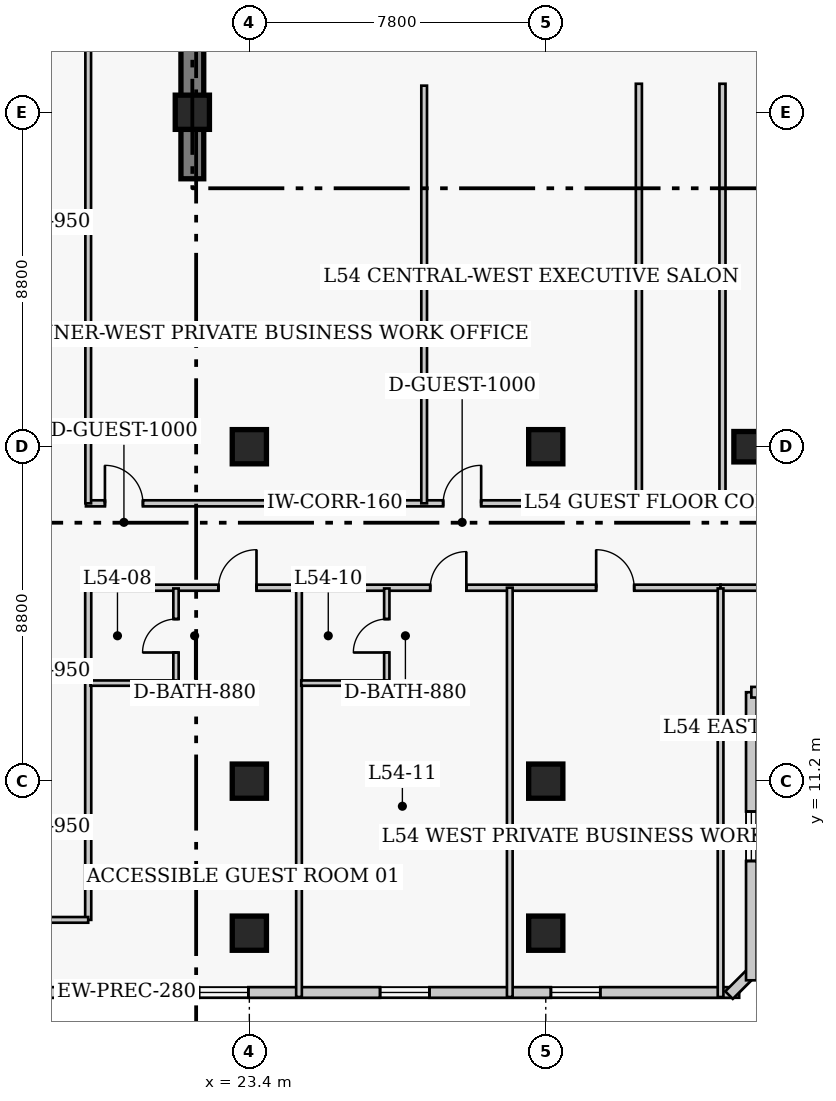
"""IFC4 building model, lengths in metres.
Left out: names, types, materials, properties, quantities, classifications, styles, units other than length and angle.
Written with IfcOpenShell. Run it as: python <this file> out.ifc"""

import sys

from ifc_helpers import new_model, si_unit, direction, frame, frame_2d, origin, origin_2d, place, context, subcontext, project, spatial, rectangle, extrude, element, fill, save


model = new_model("IFC4")
c1 = context("Model", 3, precision=1e-05, world=origin(), true_north=direction((0.0, 1.0)))
c2 = subcontext(c1, "Body", "Model", "MODEL_VIEW")
j1 = project(units=[si_unit("LENGTHUNIT", "METRE"), si_unit("PLANEANGLEUNIT", "RADIAN")], contexts=[c1])
p1 = place(None, origin())
s1 = spatial("IfcSite", under=j1, at=p1, CompositionType="ELEMENT")
p2 = place(p1, origin())
s2 = spatial("IfcBuilding", under=s1, at=p2, CompositionType="ELEMENT")
p3 = place(p2, frame((0.0, 0.0, 216.3)))
s3 = spatial("IfcBuildingStorey", under=s2, at=p3, CompositionType="ELEMENT", Elevation=216.3)
p4 = place(p3, frame((21.9, 27.05, 0.0), z_axis=(0.0, 0.0, 1.0), x_axis=(0.0, 1.0, 0.0)))
e1 = element("IfcWall", 1, at=p4, inside=s3, PredefinedType="SHEAR", context=c2, shape_type="SweptSolid", body=[
    extrude(rectangle(XDim=13.57, YDim=0.6, at=frame_2d((6.785, 0.0))), origin(), (0.0, 0.0, 1.0), 3.9),
])
for number, where, z_axis, x_axis in (
    (2, (23.4, 11.2, 0.0), (0.0, 0.0, 1.0), (1.0, 0.0, 0.0)),
    (3, (23.4, 20.0, 0.0), (0.0, 0.0, 1.0), (1.0, 0.0, 0.0)),
    (4, (31.2, 11.2, 0.0), (0.0, 0.0, 1.0), (1.0, 0.0, 0.0)),
    (5, (31.2, 20.0, 0.0), (0.0, 0.0, 1.0), (1.0, 0.0, 0.0)),
):
    element("IfcColumn", number, at=place(p3, frame(where, z_axis=z_axis, x_axis=x_axis)), inside=s3, PredefinedType="COLUMN", context=c2, shape_type="SweptSolid", body=[
        extrude(rectangle(XDim=0.9, YDim=0.9, at=origin_2d()), origin(), (0.0, 0.0, 1.0), 3.9),
    ])
p5 = place(p3, frame((36.75, 20.0, 0.0), z_axis=(0.0, 0.0, 1.0), x_axis=(1.0, 0.0, 0.0)))
e6 = element("IfcColumn", 6, at=p5, inside=s3, PredefinedType="COLUMN", context=c2, shape_type="SweptSolid", body=[
    extrude(rectangle(XDim=1.2, YDim=0.8, at=origin_2d()), origin(), (0.0, 0.0, 1.0), 3.9),
])
for number, where, z_axis, x_axis in (
    (7, (21.9, 28.8, 0.0), (0.0, 0.0, 1.0), (1.0, 0.0, 0.0)),
    (8, (23.4, 7.2, 0.0), (0.0, 0.0, 1.0), (1.0, 0.0, 0.0)),
    (9, (31.2, 7.2, 0.0), (0.0, 0.0, 1.0), (1.0, 0.0, 0.0)),
):
    element("IfcColumn", number, at=place(p3, frame(where, z_axis=z_axis, x_axis=x_axis)), inside=s3, PredefinedType="COLUMN", context=c2, shape_type="SweptSolid", body=[
        extrude(rectangle(XDim=0.9, YDim=0.9, at=origin_2d()), origin(), (0.0, 0.0, 1.0), 3.9),
    ])
p6 = place(p3, frame((10.46, 5.64, 0.0), z_axis=(0.0, 0.0, 1.0), x_axis=(1.0, 0.0, 0.0)))
e10 = element("IfcWall", 10, at=p6, inside=s3, PredefinedType="SOLIDWALL", context=c2, shape_type="SweptSolid", body=[
    extrude(rectangle(XDim=25.83, YDim=0.28, at=frame_2d((12.915, 0.0))), origin(), (0.0, 0.0, 1.0), 3.65),
])
p7 = place(p6, frame((4.305, 0.0, 0.85)))
e11 = element("IfcOpeningElement", 11, at=p7, cuts=e10, PredefinedType="OPENING", context=c2, shape_type="SweptSolid", body=[
    extrude(rectangle(XDim=1.3, YDim=1.7, at=frame_2d((0.65, 0.85))), frame((0.0, 0.15, 0.0), z_axis=(0.0, -1.0, 0.0), x_axis=(1.0, 0.0, 0.0)), (0.0, 0.0, 1.0), 0.3),
])
p8 = place(p6, frame((11.615, 0.0, 0.85)))
e12 = element("IfcOpeningElement", 12, at=p8, cuts=e10, PredefinedType="OPENING", context=c2, shape_type="SweptSolid", body=[
    extrude(rectangle(XDim=1.3, YDim=1.7, at=frame_2d((0.65, 0.85))), frame((0.0, 0.15, 0.0), z_axis=(0.0, -1.0, 0.0), x_axis=(1.0, 0.0, 0.0)), (0.0, 0.0, 1.0), 0.3),
])
p9 = place(p6, frame((20.875, 0.0, 0.85)))
e13 = element("IfcOpeningElement", 13, at=p9, cuts=e10, PredefinedType="OPENING", context=c2, shape_type="SweptSolid", body=[
    extrude(rectangle(XDim=1.3, YDim=1.7, at=frame_2d((0.65, 0.85))), frame((0.0, 0.15, 0.0), z_axis=(0.0, -1.0, 0.0), x_axis=(1.0, 0.0, 0.0)), (0.0, 0.0, 1.0), 0.3),
])
p10 = place(p6, frame((16.38, 0.0, 0.85)))
e14 = element("IfcOpeningElement", 14, at=p10, cuts=e10, PredefinedType="OPENING", context=c2, shape_type="SweptSolid", body=[
    extrude(rectangle(XDim=1.3, YDim=1.7, at=frame_2d((0.65, 0.85))), frame((0.0, 0.15, 0.0), z_axis=(0.0, -1.0, 0.0), x_axis=(1.0, 0.0, 0.0)), (0.0, 0.0, 1.0), 0.3),
])
p11 = place(p3, frame((36.023, 5.571, 0.0), z_axis=(0.0, 0.0, 1.0), x_axis=(0.707106781187, 0.707106781187, 0.0)))
e15 = element("IfcWall", 15, at=p11, inside=s3, PredefinedType="SOLIDWALL", context=c2, shape_type="SweptSolid", body=[
    extrude(rectangle(XDim=0.928, YDim=0.28, at=frame_2d((0.464, 0.0))), origin(), (0.0, 0.0, 1.0), 3.65),
])
p12 = place(p3, frame((36.61, 5.96, 0.0), z_axis=(0.0, 0.0, 1.0), x_axis=(0.0, 1.0, 0.0)))
e16 = element("IfcWall", 16, at=p12, inside=s3, PredefinedType="SOLIDWALL", context=c2, shape_type="SweptSolid", body=[
    extrude(rectangle(XDim=7.58, YDim=0.28, at=frame_2d((3.79, 0.0))), origin(), (0.0, 0.0, 1.0), 3.65),
])
p13 = place(p12, frame((3.14, 0.0, 0.85)))
e17 = element("IfcOpeningElement", 17, at=p13, cuts=e16, PredefinedType="OPENING", context=c2, shape_type="SweptSolid", body=[
    extrude(rectangle(XDim=1.3, YDim=1.7, at=frame_2d((0.65, 0.85))), frame((0.0, 0.15, 0.0), z_axis=(0.0, -1.0, 0.0), x_axis=(1.0, 0.0, 0.0)), (0.0, 0.0, 1.0), 0.3),
])
p14 = place(p3, frame((36.61, 13.54, 0.0), z_axis=(0.0, 0.0, 1.0), x_axis=(1.0, 0.0, 0.0)))
e18 = element("IfcWall", 18, at=p14, inside=s3, PredefinedType="SOLIDWALL", context=c2, shape_type="SweptSolid", body=[
    extrude(rectangle(XDim=4.78, YDim=0.28, at=frame_2d((2.39, 0.0))), origin(), (0.0, 0.0, 1.0), 3.65),
])
p15 = place(p14, frame((1.74, 0.0, 0.85)))
e19 = element("IfcOpeningElement", 19, at=p15, cuts=e18, PredefinedType="OPENING", context=c2, shape_type="SweptSolid", body=[
    extrude(rectangle(XDim=1.3, YDim=1.7, at=frame_2d((0.65, 0.85))), frame((0.0, 0.15, 0.0), z_axis=(0.0, -1.0, 0.0), x_axis=(1.0, 0.0, 0.0)), (0.0, 0.0, 1.0), 0.3),
])
p16 = place(p3, frame((19.1, 18.51, 0.0), z_axis=(0.0, 0.0, 1.0), x_axis=(1.0, 0.0, 0.0)))
e20 = element("IfcWall", 20, at=p16, inside=s3, PredefinedType="PARTITIONING", context=c2, shape_type="SweptSolid", body=[
    extrude(rectangle(XDim=14.55, YDim=0.16, at=frame_2d((7.275, 0.0))), origin(), (0.0, 0.0, 1.0), 3.65),
])
p17 = place(p16, frame((0.5, 0.0, 0.0)))
e21 = element("IfcOpeningElement", 21, at=p17, cuts=e20, PredefinedType="OPENING", context=c2, shape_type="SweptSolid", body=[
    extrude(rectangle(XDim=1.0, YDim=2.15, at=frame_2d((0.5, 1.075))), frame((0.0, 0.09, 0.0), z_axis=(0.0, -1.0, 0.0), x_axis=(1.0, 0.0, 0.0)), (0.0, 0.0, 1.0), 0.18),
])
p18 = place(p16, frame((9.4, 0.0, 0.0)))
e22 = element("IfcOpeningElement", 22, at=p18, cuts=e20, PredefinedType="OPENING", context=c2, shape_type="SweptSolid", body=[
    extrude(rectangle(XDim=1.0, YDim=2.15, at=frame_2d((0.5, 1.075))), frame((0.0, 0.09, 0.0), z_axis=(0.0, -1.0, 0.0), x_axis=(1.0, 0.0, 0.0)), (0.0, 0.0, 1.0), 0.18),
])
p19 = place(p3, frame((35.85, 18.51, 0.0), z_axis=(0.0, 0.0, 1.0), x_axis=(1.0, 0.0, 0.0)))
e23 = element("IfcWall", 23, at=p19, inside=s3, PredefinedType="PARTITIONING", context=c2, shape_type="SweptSolid", body=[
    extrude(rectangle(XDim=22.45, YDim=0.16, at=frame_2d((11.225, 0.0))), origin(), (0.0, 0.0, 1.0), 3.65),
])
p20 = place(p19, frame((6.85, 0.0, 0.0)))
e24 = element("IfcOpeningElement", 24, at=p20, cuts=e23, PredefinedType="OPENING", context=c2, shape_type="SweptSolid", body=[
    extrude(rectangle(XDim=1.0, YDim=2.15, at=frame_2d((0.5, 1.075))), frame((0.0, 0.09, 0.0), z_axis=(0.0, -1.0, 0.0), x_axis=(1.0, 0.0, 0.0)), (0.0, 0.0, 1.0), 0.18),
])
p21 = place(p19, frame((14.85, 0.0, 0.0)))
e25 = element("IfcOpeningElement", 25, at=p21, cuts=e23, PredefinedType="OPENING", context=c2, shape_type="SweptSolid", body=[
    extrude(rectangle(XDim=1.0, YDim=2.15, at=frame_2d((0.5, 1.075))), frame((0.0, 0.09, 0.0), z_axis=(0.0, -1.0, 0.0), x_axis=(1.0, 0.0, 0.0)), (0.0, 0.0, 1.0), 0.18),
])
for number, where, z_axis, x_axis in (
    (26, (33.65, 18.51, 0.0), (0.0, 0.0, 1.0), (0.0, 1.0, 0.0)),
    (27, (35.85, 18.51, 0.0), (0.0, 0.0, 1.0), (0.0, 1.0, 0.0)),
):
    element("IfcWall", number, at=place(p3, frame(where, z_axis=z_axis, x_axis=x_axis)), inside=s3, PredefinedType="PARTITIONING", context=c2, shape_type="SweptSolid", body=[
        extrude(rectangle(XDim=11.04, YDim=0.16, at=frame_2d((5.52, 0.0))), origin(), (0.0, 0.0, 1.0), 3.65),
    ])
p22 = place(p3, frame((19.1, 16.29, 0.0), z_axis=(0.0, 0.0, 1.0), x_axis=(1.0, 0.0, 0.0)))
e28 = element("IfcWall", 28, at=p22, inside=s3, PredefinedType="PARTITIONING", context=c2, shape_type="SweptSolid", body=[
    extrude(rectangle(XDim=16.7, YDim=0.16, at=frame_2d((8.35, 0.0))), origin(), (0.0, 0.0, 1.0), 3.65),
])
p23 = place(p22, frame((3.488, 0.0, 0.0)))
e29 = element("IfcOpeningElement", 29, at=p23, cuts=e28, PredefinedType="OPENING", context=c2, shape_type="SweptSolid", body=[
    extrude(rectangle(XDim=1.0, YDim=2.15, at=frame_2d((0.5, 1.075))), frame((0.0, 0.09, 0.0), z_axis=(0.0, -1.0, 0.0), x_axis=(1.0, 0.0, 0.0)), (0.0, 0.0, 1.0), 0.18),
])
p24 = place(p22, frame((9.06, 0.0, 0.0)))
e30 = element("IfcOpeningElement", 30, at=p24, cuts=e28, PredefinedType="OPENING", context=c2, shape_type="SweptSolid", body=[
    extrude(rectangle(XDim=0.95, YDim=2.1, at=frame_2d((0.475, 1.05))), frame((0.0, 0.09, 0.0), z_axis=(0.0, -1.0, 0.0), x_axis=(1.0, 0.0, 0.0)), (0.0, 0.0, 1.0), 0.18),
])
p25 = place(p22, frame((13.427, 0.0, 0.0)))
e31 = element("IfcOpeningElement", 31, at=p25, cuts=e28, PredefinedType="OPENING", context=c2, shape_type="SweptSolid", body=[
    extrude(rectangle(XDim=1.0, YDim=2.15, at=frame_2d((0.5, 1.075))), frame((0.0, 0.09, 0.0), z_axis=(0.0, -1.0, 0.0), x_axis=(1.0, 0.0, 0.0)), (0.0, 0.0, 1.0), 0.18),
])
p26 = place(p3, frame((35.8, 16.29, 0.0), z_axis=(0.0, 0.0, 1.0), x_axis=(1.0, 0.0, 0.0)))
e32 = element("IfcWall", 32, at=p26, inside=s3, PredefinedType="PARTITIONING", context=c2, shape_type="SweptSolid", body=[
    extrude(rectangle(XDim=22.5, YDim=0.16, at=frame_2d((11.25, 0.0))), origin(), (0.0, 0.0, 1.0), 3.65),
])
p27 = place(p26, frame((2.69, 0.0, 0.0)))
e33 = element("IfcOpeningElement", 33, at=p27, cuts=e32, PredefinedType="OPENING", context=c2, shape_type="SweptSolid", body=[
    extrude(rectangle(XDim=1.0, YDim=2.15, at=frame_2d((0.5, 1.075))), frame((0.0, 0.09, 0.0), z_axis=(0.0, -1.0, 0.0), x_axis=(1.0, 0.0, 0.0)), (0.0, 0.0, 1.0), 0.18),
])
p28 = place(p26, frame((10.8, 0.0, 0.0)))
e34 = element("IfcOpeningElement", 34, at=p28, cuts=e32, PredefinedType="OPENING", context=c2, shape_type="SweptSolid", body=[
    extrude(rectangle(XDim=0.95, YDim=2.1, at=frame_2d((0.475, 1.05))), frame((0.0, 0.09, 0.0), z_axis=(0.0, -1.0, 0.0), x_axis=(1.0, 0.0, 0.0)), (0.0, 0.0, 1.0), 0.18),
])
p29 = place(p26, frame((18.83, 0.0, 0.0)))
e35 = element("IfcOpeningElement", 35, at=p29, cuts=e32, PredefinedType="OPENING", context=c2, shape_type="SweptSolid", body=[
    extrude(rectangle(XDim=0.95, YDim=2.1, at=frame_2d((0.475, 1.05))), frame((0.0, 0.09, 0.0), z_axis=(0.0, -1.0, 0.0), x_axis=(1.0, 0.0, 0.0)), (0.0, 0.0, 1.0), 0.18),
])
p30 = place(p3, frame((19.16, 7.55, 0.0), z_axis=(0.0, 0.0, 1.0), x_axis=(0.0, 1.0, 0.0)))
e36 = element("IfcWall", 36, at=p30, inside=s3, PredefinedType="PARTITIONING", context=c2, shape_type="SweptSolid", body=[
    extrude(rectangle(XDim=8.74, YDim=0.16, at=frame_2d((4.37, 0.0))), origin(), (0.0, 0.0, 1.0), 3.65),
])
p31 = place(p3, frame((16.94, 7.55, 0.0), z_axis=(0.0, 0.0, 1.0), x_axis=(1.0, 0.0, 0.0)))
e37 = element("IfcWall", 37, at=p31, inside=s3, PredefinedType="PARTITIONING", context=c2, shape_type="SweptSolid", body=[
    extrude(rectangle(XDim=2.22, YDim=0.15, at=frame_2d((1.11, 0.0))), origin(), (0.0, 0.0, 1.0), 3.65),
])
p32 = place(p3, frame((19.16, 18.51, 0.0), z_axis=(0.0, 0.0, 1.0), x_axis=(0.0, 1.0, 0.0)))
e38 = element("IfcWall", 38, at=p32, inside=s3, PredefinedType="PARTITIONING", context=c2, shape_type="SweptSolid", body=[
    extrude(rectangle(XDim=14.29, YDim=0.15, at=frame_2d((7.145, 0.0))), origin(), (0.0, 0.0, 1.0), 3.65),
])
p33 = place(p3, frame((28.0, 18.51, 0.0), z_axis=(0.0, 0.0, 1.0), x_axis=(0.0, 1.0, 0.0)))
e39 = element("IfcWall", 39, at=p33, inside=s3, PredefinedType="PARTITIONING", context=c2, shape_type="SweptSolid", body=[
    extrude(rectangle(XDim=10.99, YDim=0.15, at=frame_2d((5.495, 0.0))), origin(), (0.0, 0.0, 1.0), 3.65),
])
p34 = place(p3, frame((21.47, 13.78, 0.0), z_axis=(0.0, 0.0, 1.0), x_axis=(0.0, 1.0, 0.0)))
e40 = element("IfcWall", 40, at=p34, inside=s3, PredefinedType="PLUMBINGWALL", context=c2, shape_type="SweptSolid", body=[
    extrude(rectangle(XDim=2.49, YDim=0.14, at=frame_2d((1.245, 0.0))), origin(), (0.0, 0.0, 1.0), 3.65),
])
p35 = place(p34, frame((0.805, 0.0, 0.0)))
e41 = element("IfcOpeningElement", 41, at=p35, cuts=e40, PredefinedType="OPENING", context=c2, shape_type="SweptSolid", body=[
    extrude(rectangle(XDim=0.88, YDim=2.05, at=frame_2d((0.44, 1.025))), frame((0.0, 0.08, 0.0), z_axis=(0.0, -1.0, 0.0), x_axis=(1.0, 0.0, 0.0)), (0.0, 0.0, 1.0), 0.16),
])
p36 = place(p3, frame((19.22, 13.78, 0.0), z_axis=(0.0, 0.0, 1.0), x_axis=(1.0, 0.0, 0.0)))
e42 = element("IfcWall", 42, at=p36, inside=s3, PredefinedType="PLUMBINGWALL", context=c2, shape_type="SweptSolid", body=[
    extrude(rectangle(XDim=2.25, YDim=0.14, at=frame_2d((1.125, 0.0))), origin(), (0.0, 0.0, 1.0), 3.65),
])
p37 = place(p3, frame((24.707, 5.52, 0.0), z_axis=(0.0, 0.0, 1.0), x_axis=(0.0, 1.0, 0.0)))
e43 = element("IfcWall", 43, at=p37, inside=s3, PredefinedType="PARTITIONING", context=c2, shape_type="SweptSolid", body=[
    extrude(rectangle(XDim=10.77, YDim=0.15, at=frame_2d((5.385, 0.0))), origin(), (0.0, 0.0, 1.0), 3.65),
])
p38 = place(p3, frame((27.017, 13.78, 0.0), z_axis=(0.0, 0.0, 1.0), x_axis=(0.0, 1.0, 0.0)))
e44 = element("IfcWall", 44, at=p38, inside=s3, PredefinedType="PLUMBINGWALL", context=c2, shape_type="SweptSolid", body=[
    extrude(rectangle(XDim=2.49, YDim=0.14, at=frame_2d((1.245, 0.0))), origin(), (0.0, 0.0, 1.0), 3.65),
])
p39 = place(p38, frame((0.805, 0.0, 0.0)))
e45 = element("IfcOpeningElement", 45, at=p39, cuts=e44, PredefinedType="OPENING", context=c2, shape_type="SweptSolid", body=[
    extrude(rectangle(XDim=0.88, YDim=2.05, at=frame_2d((0.44, 1.025))), frame((0.0, 0.08, 0.0), z_axis=(0.0, -1.0, 0.0), x_axis=(1.0, 0.0, 0.0)), (0.0, 0.0, 1.0), 0.16),
])
p40 = place(p3, frame((24.767, 13.78, 0.0), z_axis=(0.0, 0.0, 1.0), x_axis=(1.0, 0.0, 0.0)))
e46 = element("IfcWall", 46, at=p40, inside=s3, PredefinedType="PLUMBINGWALL", context=c2, shape_type="SweptSolid", body=[
    extrude(rectangle(XDim=2.25, YDim=0.14, at=frame_2d((1.125, 0.0))), origin(), (0.0, 0.0, 1.0), 3.65),
])
p41 = place(p3, frame((30.253, 5.52, 0.0), z_axis=(0.0, 0.0, 1.0), x_axis=(0.0, 1.0, 0.0)))
e47 = element("IfcWall", 47, at=p41, inside=s3, PredefinedType="PARTITIONING", context=c2, shape_type="SweptSolid", body=[
    extrude(rectangle(XDim=10.77, YDim=0.15, at=frame_2d((5.385, 0.0))), origin(), (0.0, 0.0, 1.0), 3.65),
])
p42 = place(p3, frame((35.8, 5.52, 0.0), z_axis=(0.0, 0.0, 1.0), x_axis=(0.0, 1.0, 0.0)))
e48 = element("IfcWall", 48, at=p42, inside=s3, PredefinedType="PARTITIONING", context=c2, shape_type="SweptSolid", body=[
    extrude(rectangle(XDim=10.75, YDim=0.15, at=frame_2d((5.375, 0.0))), origin(), (0.0, 0.0, 1.0), 3.65),
])
p43 = place(p8, origin())
e49 = element("IfcWindow", 49, at=p43, inside=s3, PartitioningType="SINGLE_PANEL", PredefinedType="WINDOW", context=c2, shape_type="SweptSolid", body=[
    extrude(rectangle(XDim=1.3, YDim=1.7, at=frame_2d((0.65, 0.85))), frame((0.0, 0.03, 0.0), z_axis=(0.0, -1.0, 0.0), x_axis=(1.0, 0.0, 0.0)), (0.0, 0.0, 1.0), 0.06),
])
fill(e12, e49)
p44 = place(p9, origin())
e50 = element("IfcWindow", 50, at=p44, inside=s3, PartitioningType="SINGLE_PANEL", PredefinedType="WINDOW", context=c2, shape_type="SweptSolid", body=[
    extrude(rectangle(XDim=1.3, YDim=1.7, at=frame_2d((0.65, 0.85))), frame((0.0, 0.03, 0.0), z_axis=(0.0, -1.0, 0.0), x_axis=(1.0, 0.0, 0.0)), (0.0, 0.0, 1.0), 0.06),
])
fill(e13, e50)
p45 = place(p13, origin())
e51 = element("IfcWindow", 51, at=p45, inside=s3, PartitioningType="SINGLE_PANEL", PredefinedType="WINDOW", context=c2, shape_type="SweptSolid", body=[
    extrude(rectangle(XDim=1.3, YDim=1.7, at=frame_2d((0.65, 0.85))), frame((0.0, 0.03, 0.0), z_axis=(0.0, -1.0, 0.0), x_axis=(1.0, 0.0, 0.0)), (0.0, 0.0, 1.0), 0.06),
])
fill(e17, e51)
p46 = place(p10, origin())
e52 = element("IfcWindow", 52, at=p46, inside=s3, PartitioningType="SINGLE_PANEL", PredefinedType="WINDOW", context=c2, shape_type="SweptSolid", body=[
    extrude(rectangle(XDim=1.3, YDim=1.7, at=frame_2d((0.65, 0.85))), frame((0.0, 0.03, 0.0), z_axis=(0.0, -1.0, 0.0), x_axis=(1.0, 0.0, 0.0)), (0.0, 0.0, 1.0), 0.06),
])
fill(e14, e52)
p47 = place(p17, origin())
e53 = element("IfcDoor", 53, at=p47, inside=s3, OperationType="SINGLE_SWING_LEFT", PredefinedType="DOOR", context=c2, shape_type="SweptSolid", body=[
    extrude(rectangle(XDim=1.0, YDim=2.15, at=frame_2d((0.5, 1.075))), frame((0.0, 0.025, 0.0), z_axis=(0.0, -1.0, 0.0), x_axis=(1.0, 0.0, 0.0)), (0.0, 0.0, 1.0), 0.05),
])
fill(e21, e53)
p48 = place(p18, origin())
e54 = element("IfcDoor", 54, at=p48, inside=s3, OperationType="SINGLE_SWING_RIGHT", PredefinedType="DOOR", context=c2, shape_type="SweptSolid", body=[
    extrude(rectangle(XDim=1.0, YDim=2.15, at=frame_2d((0.5, 1.075))), frame((0.0, 0.025, 0.0), z_axis=(0.0, -1.0, 0.0), x_axis=(1.0, 0.0, 0.0)), (0.0, 0.0, 1.0), 0.05),
])
fill(e22, e54)
p49 = place(p35, origin())
e55 = element("IfcDoor", 55, at=p49, inside=s3, OperationType="SINGLE_SWING_LEFT", PredefinedType="DOOR", context=c2, shape_type="SweptSolid", body=[
    extrude(rectangle(XDim=0.88, YDim=2.05, at=frame_2d((0.44, 1.025))), frame((0.0, 0.025, 0.0), z_axis=(0.0, -1.0, 0.0), x_axis=(1.0, 0.0, 0.0)), (0.0, 0.0, 1.0), 0.05),
])
fill(e41, e55)
p50 = place(p23, origin())
e56 = element("IfcDoor", 56, at=p50, inside=s3, OperationType="SINGLE_SWING_RIGHT", PredefinedType="DOOR", context=c2, shape_type="SweptSolid", body=[
    extrude(rectangle(XDim=1.0, YDim=2.15, at=frame_2d((0.5, 1.075))), frame((0.0, 0.025, 0.0), z_axis=(0.0, -1.0, 0.0), x_axis=(1.0, 0.0, 0.0)), (0.0, 0.0, 1.0), 0.05),
])
fill(e29, e56)
p51 = place(p39, origin())
e57 = element("IfcDoor", 57, at=p51, inside=s3, OperationType="SINGLE_SWING_LEFT", PredefinedType="DOOR", context=c2, shape_type="SweptSolid", body=[
    extrude(rectangle(XDim=0.88, YDim=2.05, at=frame_2d((0.44, 1.025))), frame((0.0, 0.025, 0.0), z_axis=(0.0, -1.0, 0.0), x_axis=(1.0, 0.0, 0.0)), (0.0, 0.0, 1.0), 0.05),
])
fill(e45, e57)
p52 = place(p24, origin())
e58 = element("IfcDoor", 58, at=p52, inside=s3, OperationType="SINGLE_SWING_RIGHT", PredefinedType="DOOR", context=c2, shape_type="SweptSolid", body=[
    extrude(rectangle(XDim=0.95, YDim=2.1, at=frame_2d((0.475, 1.05))), frame((0.0, 0.025, 0.0), z_axis=(0.0, -1.0, 0.0), x_axis=(1.0, 0.0, 0.0)), (0.0, 0.0, 1.0), 0.05),
])
fill(e30, e58)
p53 = place(p25, origin())
e59 = element("IfcDoor", 59, at=p53, inside=s3, OperationType="SINGLE_SWING_LEFT", PredefinedType="DOOR", context=c2, shape_type="SweptSolid", body=[
    extrude(rectangle(XDim=1.0, YDim=2.15, at=frame_2d((0.5, 1.075))), frame((0.0, 0.025, 0.0), z_axis=(0.0, -1.0, 0.0), x_axis=(1.0, 0.0, 0.0)), (0.0, 0.0, 1.0), 0.05),
])
fill(e31, e59)
save(model, sys.argv[1])
